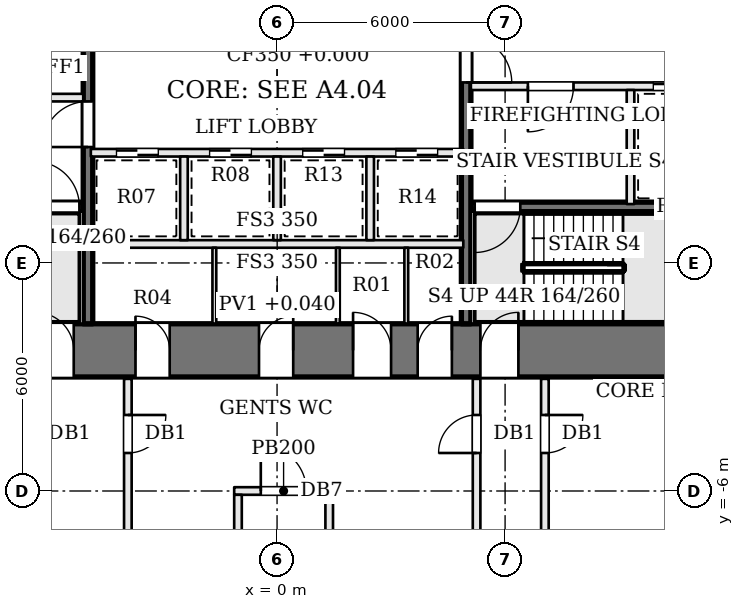
"""IFC4 building model, lengths in metres.
Left out: names, types, materials, properties, quantities, classifications, styles, units other than length and angle.
Written with IfcOpenShell. Run it as: python <this file> out.ifc"""

import sys

from ifc_helpers import new_model, si_unit, direction, frame, frame_2d, origin, place, context, subcontext, project, spatial, rectangle, extrude, element, fill, save


model = new_model("IFC4")
c1 = context("Model", 3, precision=1e-05, world=origin(), true_north=direction((0.0, 1.0)))
c2 = subcontext(c1, "Body", "Model", "MODEL_VIEW")
j1 = project(units=[si_unit("LENGTHUNIT", "METRE"), si_unit("PLANEANGLEUNIT", "RADIAN")], contexts=[c1])
p1 = place(None, origin())
s1 = spatial("IfcSite", under=j1, at=p1, CompositionType="ELEMENT")
p2 = place(p1, origin())
s2 = spatial("IfcBuilding", under=s1, at=p2, CompositionType="ELEMENT")
p3 = place(p2, origin())
s3 = spatial("IfcBuildingStorey", under=s2, at=p3, CompositionType="ELEMENT", Elevation=0.0)
p4 = place(p3, frame((-13.0, -2.3, 0.0), z_axis=(0.0, 0.0, 1.0), x_axis=(1.0, 0.0, 0.0)))
e1 = element("IfcWall", 1, at=p4, inside=s3, PredefinedType="SHEAR", context=c2, shape_type="SweptSolid", body=[
    extrude(rectangle(XDim=26.0, YDim=1.4, at=frame_2d((13.0, 0.0))), origin(), (0.0, 0.0, 1.0), 7.2),
])
p5 = place(p4, frame((9.275, 0.0, 0.0)))
e2 = element("IfcOpeningElement", 2, at=p5, cuts=e1, PredefinedType="OPENING", context=c2, shape_type="SweptSolid", body=[
    extrude(rectangle(XDim=0.9, YDim=2.1, at=frame_2d((0.45, 1.05))), frame((0.0, 0.71, 0.0), z_axis=(0.0, -1.0, 0.0), x_axis=(1.0, 0.0, 0.0)), (0.0, 0.0, 1.0), 1.42),
])
p6 = place(p4, frame((12.525, 0.0, 0.0)))
e3 = element("IfcOpeningElement", 3, at=p6, cuts=e1, PredefinedType="OPENING", context=c2, shape_type="SweptSolid", body=[
    extrude(rectangle(XDim=0.9, YDim=2.1, at=frame_2d((0.45, 1.05))), frame((0.0, 0.71, 0.0), z_axis=(0.0, -1.0, 0.0), x_axis=(1.0, 0.0, 0.0)), (0.0, 0.0, 1.0), 1.42),
])
p7 = place(p4, frame((15.0, 0.0, 0.0)))
e4 = element("IfcOpeningElement", 4, at=p7, cuts=e1, PredefinedType="OPENING", context=c2, shape_type="SweptSolid", body=[
    extrude(rectangle(XDim=1.0, YDim=2.1, at=frame_2d((0.5, 1.05))), frame((0.0, 0.71, 0.0), z_axis=(0.0, -1.0, 0.0), x_axis=(1.0, 0.0, 0.0)), (0.0, 0.0, 1.0), 1.42),
])
p8 = place(p4, frame((16.7, 0.0, 0.0)))
e5 = element("IfcOpeningElement", 5, at=p8, cuts=e1, PredefinedType="OPENING", context=c2, shape_type="SweptSolid", body=[
    extrude(rectangle(XDim=0.9, YDim=2.1, at=frame_2d((0.45, 1.05))), frame((0.0, 0.71, 0.0), z_axis=(0.0, -1.0, 0.0), x_axis=(1.0, 0.0, 0.0)), (0.0, 0.0, 1.0), 1.42),
])
p9 = place(p4, frame((6.65, 0.0, 0.0)))
e6 = element("IfcOpeningElement", 6, at=p9, cuts=e1, PredefinedType="OPENING", context=c2, shape_type="SweptSolid", body=[
    extrude(rectangle(XDim=1.0, YDim=2.1, at=frame_2d((0.5, 1.05))), frame((0.0, 0.71, 0.0), z_axis=(0.0, -1.0, 0.0), x_axis=(1.0, 0.0, 0.0)), (0.0, 0.0, 1.0), 1.42),
])
p10 = place(p4, frame((18.35, 0.0, 0.0)))
e7 = element("IfcOpeningElement", 7, at=p10, cuts=e1, PredefinedType="OPENING", context=c2, shape_type="SweptSolid", body=[
    extrude(rectangle(XDim=1.0, YDim=2.1, at=frame_2d((0.5, 1.05))), frame((0.0, 0.71, 0.0), z_axis=(0.0, -1.0, 0.0), x_axis=(1.0, 0.0, 0.0)), (0.0, 0.0, 1.0), 1.42),
])
p11 = place(p3, frame((-11.6, 1.475, 0.0), z_axis=(0.0, 0.0, 1.0), x_axis=(1.0, 0.0, 0.0)))
e8 = element("IfcWall", 8, at=p11, inside=s3, PredefinedType="SOLIDWALL", context=c2, shape_type="SweptSolid", body=[
    extrude(rectangle(XDim=6.5, YDim=0.25, at=frame_2d((3.25, 0.0))), origin(), (0.0, 0.0, 1.0), 6.95),
])
p12 = place(p11, frame((5.2, 0.0, 0.0)))
e9 = element("IfcOpeningElement", 9, at=p12, cuts=e8, PredefinedType="OPENING", context=c2, shape_type="SweptSolid", body=[
    extrude(rectangle(XDim=1.2, YDim=2.1, at=frame_2d((0.6, 1.05))), frame((0.0, 0.135, 0.0), z_axis=(0.0, -1.0, 0.0), x_axis=(1.0, 0.0, 0.0)), (0.0, 0.0, 1.0), 0.27),
])
p13 = place(p3, frame((-11.6, 4.35, 0.0), z_axis=(0.0, 0.0, 1.0), x_axis=(1.0, 0.0, 0.0)))
e10 = element("IfcWall", 10, at=p13, inside=s3, PredefinedType="SOLIDWALL", context=c2, shape_type="SweptSolid", body=[
    extrude(rectangle(XDim=6.5, YDim=0.2, at=frame_2d((3.25, 0.0))), origin(), (0.0, 0.0, 1.0), 6.95),
])
p14 = place(p13, frame((3.8, 0.0, 0.0)))
e11 = element("IfcOpeningElement", 11, at=p14, cuts=e10, PredefinedType="OPENING", context=c2, shape_type="SweptSolid", body=[
    extrude(rectangle(XDim=1.2, YDim=2.1, at=frame_2d((0.6, 1.05))), frame((0.0, 0.11, 0.0), z_axis=(0.0, -1.0, 0.0), x_axis=(1.0, 0.0, 0.0)), (0.0, 0.0, 1.0), 0.22),
])
p15 = place(p13, frame((0.5, 0.0, 0.0)))
e12 = element("IfcOpeningElement", 12, at=p15, cuts=e10, PredefinedType="OPENING", context=c2, shape_type="SweptSolid", body=[
    extrude(rectangle(XDim=1.2, YDim=2.1, at=frame_2d((0.6, 1.05))), frame((0.0, 0.11, 0.0), z_axis=(0.0, -1.0, 0.0), x_axis=(1.0, 0.0, 0.0)), (0.0, 0.0, 1.0), 0.22),
])
p16 = place(p3, frame((11.6, 4.65, 0.0), z_axis=(0.0, 0.0, 1.0), x_axis=(-1.0, 0.0, 0.0)))
e13 = element("IfcWall", 13, at=p16, inside=s3, PredefinedType="SOLIDWALL", context=c2, shape_type="SweptSolid", body=[
    extrude(rectangle(XDim=6.5, YDim=0.2, at=frame_2d((3.25, 0.0))), origin(), (0.0, 0.0, 1.0), 6.95),
])
p17 = place(p16, frame((3.8, 0.0, 0.0)))
e14 = element("IfcOpeningElement", 14, at=p17, cuts=e13, PredefinedType="OPENING", context=c2, shape_type="SweptSolid", body=[
    extrude(rectangle(XDim=1.2, YDim=2.1, at=frame_2d((0.6, 1.05))), frame((0.0, 0.11, 0.0), z_axis=(0.0, -1.0, 0.0), x_axis=(1.0, 0.0, 0.0)), (0.0, 0.0, 1.0), 0.22),
])
p18 = place(p16, frame((0.5, 0.0, 0.0)))
e15 = element("IfcOpeningElement", 15, at=p18, cuts=e13, PredefinedType="OPENING", context=c2, shape_type="SweptSolid", body=[
    extrude(rectangle(XDim=1.2, YDim=2.1, at=frame_2d((0.6, 1.05))), frame((0.0, 0.11, 0.0), z_axis=(0.0, -1.0, 0.0), x_axis=(1.0, 0.0, 0.0)), (0.0, 0.0, 1.0), 0.22),
])
p19 = place(p3, frame((11.6, 1.475, 0.0), z_axis=(0.0, 0.0, 1.0), x_axis=(-1.0, 0.0, 0.0)))
e16 = element("IfcWall", 16, at=p19, inside=s3, PredefinedType="SOLIDWALL", context=c2, shape_type="SweptSolid", body=[
    extrude(rectangle(XDim=6.5, YDim=0.25, at=frame_2d((3.25, 0.0))), origin(), (0.0, 0.0, 1.0), 6.95),
])
p20 = place(p19, frame((5.2, 0.0, 0.0)))
e17 = element("IfcOpeningElement", 17, at=p20, cuts=e16, PredefinedType="OPENING", context=c2, shape_type="SweptSolid", body=[
    extrude(rectangle(XDim=1.2, YDim=2.1, at=frame_2d((0.6, 1.05))), frame((0.0, 0.135, 0.0), z_axis=(0.0, -1.0, 0.0), x_axis=(1.0, 0.0, 0.0)), (0.0, 0.0, 1.0), 0.27),
])
p21 = place(p3, frame((9.3, 4.55, 0.0), z_axis=(0.0, 0.0, 1.0), x_axis=(0.0, -1.0, 0.0)))
e18 = element("IfcWall", 18, at=p21, inside=s3, PredefinedType="SOLIDWALL", context=c2, shape_type="SweptSolid", body=[
    extrude(rectangle(XDim=3.0, YDim=0.2, at=frame_2d((1.5, 0.0))), origin(), (0.0, 0.0, 1.0), 6.95),
])
p22 = place(p3, frame((-4.975, -1.6, 0.0), z_axis=(0.0, 0.0, 1.0), x_axis=(0.0, 1.0, 0.0)))
e19 = element("IfcWall", 19, at=p22, inside=s3, PredefinedType="SOLIDWALL", context=c2, shape_type="SweptSolid", body=[
    extrude(rectangle(XDim=12.2, YDim=0.25, at=frame_2d((6.1, 0.0))), origin(), (0.0, 0.0, 1.0), 6.95),
])
p23 = place(p22, frame((4.65, 0.0, 0.0)))
e20 = element("IfcOpeningElement", 20, at=p23, cuts=e19, PredefinedType="OPENING", context=c2, shape_type="SweptSolid", body=[
    extrude(rectangle(XDim=1.2, YDim=2.1, at=frame_2d((0.6, 1.05))), frame((0.0, 0.135, 0.0), z_axis=(0.0, -1.0, 0.0), x_axis=(1.0, 0.0, 0.0)), (0.0, 0.0, 1.0), 0.27),
])
p24 = place(p3, frame((4.975, 10.6, 0.0), z_axis=(0.0, 0.0, 1.0), x_axis=(0.0, -1.0, 0.0)))
e21 = element("IfcWall", 21, at=p24, inside=s3, PredefinedType="SOLIDWALL", context=c2, shape_type="SweptSolid", body=[
    extrude(rectangle(XDim=12.2, YDim=0.25, at=frame_2d((6.1, 0.0))), origin(), (0.0, 0.0, 1.0), 6.95),
])
p25 = place(p24, frame((4.65, 0.0, 0.0)))
e22 = element("IfcOpeningElement", 22, at=p25, cuts=e21, PredefinedType="OPENING", context=c2, shape_type="SweptSolid", body=[
    extrude(rectangle(XDim=1.2, YDim=2.1, at=frame_2d((0.6, 1.05))), frame((0.0, 0.135, 0.0), z_axis=(0.0, -1.0, 0.0), x_axis=(1.0, 0.0, 0.0)), (0.0, 0.0, 1.0), 0.27),
])
p26 = place(p3, frame((-4.9, 0.5, 0.0), z_axis=(0.0, 0.0, 1.0), x_axis=(1.0, 0.0, 0.0)))
e23 = element("IfcWall", 23, at=p26, inside=s3, PredefinedType="SOLIDWALL", context=c2, shape_type="SweptSolid", body=[
    extrude(rectangle(XDim=9.8, YDim=0.2, at=frame_2d((4.9, 0.0))), origin(), (0.0, 0.0, 1.0), 6.95),
])
p27 = place(p3, frame((-4.9, 2.9, 0.0), z_axis=(0.0, 0.0, 1.0), x_axis=(1.0, 0.0, 0.0)))
e24 = element("IfcWall", 24, at=p27, inside=s3, PredefinedType="SOLIDWALL", context=c2, shape_type="SweptSolid", body=[
    extrude(rectangle(XDim=9.8, YDim=0.2, at=frame_2d((4.9, 0.0))), origin(), (0.0, 0.0, 1.0), 6.95),
])
p28 = place(p27, frame((0.675, 0.0, 0.0)))
e25 = element("IfcOpeningElement", 25, at=p28, cuts=e24, PredefinedType="OPENING", context=c2, shape_type="SweptSolid", body=[
    extrude(rectangle(XDim=1.1, YDim=2.1, at=frame_2d((0.55, 1.05))), frame((0.0, 0.11, 0.0), z_axis=(0.0, -1.0, 0.0), x_axis=(1.0, 0.0, 0.0)), (0.0, 0.0, 1.0), 0.22),
])
p29 = place(p27, frame((3.125, 0.0, 0.0)))
e26 = element("IfcOpeningElement", 26, at=p29, cuts=e24, PredefinedType="OPENING", context=c2, shape_type="SweptSolid", body=[
    extrude(rectangle(XDim=1.1, YDim=2.1, at=frame_2d((0.55, 1.05))), frame((0.0, 0.11, 0.0), z_axis=(0.0, -1.0, 0.0), x_axis=(1.0, 0.0, 0.0)), (0.0, 0.0, 1.0), 0.22),
])
p30 = place(p27, frame((5.575, 0.0, 0.0)))
e27 = element("IfcOpeningElement", 27, at=p30, cuts=e24, PredefinedType="OPENING", context=c2, shape_type="SweptSolid", body=[
    extrude(rectangle(XDim=1.1, YDim=2.1, at=frame_2d((0.55, 1.05))), frame((0.0, 0.11, 0.0), z_axis=(0.0, -1.0, 0.0), x_axis=(1.0, 0.0, 0.0)), (0.0, 0.0, 1.0), 0.22),
])
p31 = place(p27, frame((8.025, 0.0, 0.0)))
e28 = element("IfcOpeningElement", 28, at=p31, cuts=e24, PredefinedType="OPENING", context=c2, shape_type="SweptSolid", body=[
    extrude(rectangle(XDim=1.1, YDim=2.1, at=frame_2d((0.55, 1.05))), frame((0.0, 0.11, 0.0), z_axis=(0.0, -1.0, 0.0), x_axis=(1.0, 0.0, 0.0)), (0.0, 0.0, 1.0), 0.22),
])
for number, where, z_axis, x_axis in (
    (29, (-2.45, 0.6, 0.0), (0.0, 0.0, 1.0), (0.0, 1.0, 0.0)),
    (30, (0.0, 0.6, 0.0), (0.0, 0.0, 1.0), (0.0, 1.0, 0.0)),
    (31, (2.45, 0.6, 0.0), (0.0, 0.0, 1.0), (0.0, 1.0, 0.0)),
):
    element("IfcWall", number, at=place(p3, frame(where, z_axis=z_axis, x_axis=x_axis)), inside=s3, PredefinedType="SOLIDWALL", context=c2, shape_type="SweptSolid", body=[
        extrude(rectangle(XDim=2.2, YDim=0.2, at=frame_2d((1.1, 0.0))), origin(), (0.0, 0.0, 1.0), 6.95),
    ])
for number, where, z_axis, x_axis in (
    (32, (-1.65, -1.6, 0.0), (0.0, 0.0, 1.0), (0.0, 1.0, 0.0)),
    (33, (1.6, -1.6, 0.0), (0.0, 0.0, 1.0), (0.0, 1.0, 0.0)),
    (34, (3.4, -1.6, 0.0), (0.0, 0.0, 1.0), (0.0, 1.0, 0.0)),
):
    element("IfcWall", number, at=place(p3, frame(where, z_axis=z_axis, x_axis=x_axis)), inside=s3, PredefinedType="PARTITIONING", context=c2, shape_type="SweptSolid", body=[
        extrude(rectangle(XDim=2.0, YDim=0.1, at=frame_2d((1.0, 0.0))), origin(), (0.0, 0.0, 1.0), 6.95),
    ])
p32 = place(p3, frame((-3.926, -3.05, 0.0), z_axis=(0.0, 0.0, 1.0), x_axis=(0.0, -1.0, 0.0)))
e35 = element("IfcWall", 35, at=p32, inside=s3, PredefinedType="PARTITIONING", context=c2, shape_type="SweptSolid", body=[
    extrude(rectangle(XDim=19.252, YDim=0.2, at=frame_2d((9.626, 0.0))), origin(), (0.0, 0.0, 1.0), 6.23),
])
p33 = place(p32, frame((0.95, 0.0, 0.0)))
e36 = element("IfcOpeningElement", 36, at=p33, cuts=e35, PredefinedType="OPENING", context=c2, shape_type="SweptSolid", body=[
    extrude(rectangle(XDim=1.0, YDim=2.1, at=frame_2d((0.5, 1.05))), frame((0.0, 0.11, 0.0), z_axis=(0.0, -1.0, 0.0), x_axis=(1.0, 0.0, 0.0)), (0.0, 0.0, 1.0), 0.22),
])
p34 = place(p3, frame((7.047, -3.05, 0.0), z_axis=(0.0, 0.0, 1.0), x_axis=(0.0, -1.0, 0.0)))
e37 = element("IfcWall", 37, at=p34, inside=s3, PredefinedType="PARTITIONING", context=c2, shape_type="SweptSolid", body=[
    extrude(rectangle(XDim=18.98, YDim=0.2, at=frame_2d((9.49, 0.0))), origin(), (0.0, 0.0, 1.0), 6.23),
])
p35 = place(p34, frame((0.95, 0.0, 0.0)))
e38 = element("IfcOpeningElement", 38, at=p35, cuts=e37, PredefinedType="OPENING", context=c2, shape_type="SweptSolid", body=[
    extrude(rectangle(XDim=1.0, YDim=2.1, at=frame_2d((0.5, 1.05))), frame((0.0, 0.11, 0.0), z_axis=(0.0, -1.0, 0.0), x_axis=(1.0, 0.0, 0.0)), (0.0, 0.0, 1.0), 0.22),
])
p36 = place(p3, frame((5.25, -22.21, 0.0), z_axis=(0.0, 0.0, 1.0), x_axis=(0.0, 1.0, 0.0)))
e39 = element("IfcWall", 39, at=p36, inside=s3, PredefinedType="PARTITIONING", context=c2, shape_type="SweptSolid", body=[
    extrude(rectangle(XDim=19.16, YDim=0.2, at=frame_2d((9.58, 0.0))), origin(), (0.0, 0.0, 1.0), 6.23),
])
p37 = place(p36, frame((17.21, 0.0, 0.0)))
e40 = element("IfcOpeningElement", 40, at=p37, cuts=e39, PredefinedType="OPENING", context=c2, shape_type="SweptSolid", body=[
    extrude(rectangle(XDim=1.0, YDim=2.1, at=frame_2d((0.5, 1.05))), frame((0.0, 0.11, 0.0), z_axis=(0.0, -1.0, 0.0), x_axis=(1.0, 0.0, 0.0)), (0.0, 0.0, 1.0), 0.22),
])
p38 = place(p3, frame((-1.128, -6.0, 0.0), z_axis=(0.0, 0.0, 1.0), x_axis=(1.0, 0.0, 0.0)))
e41 = element("IfcWall", 41, at=p38, inside=s3, PredefinedType="PARTITIONING", context=c2, shape_type="SweptSolid", body=[
    extrude(rectangle(XDim=2.6, YDim=0.2, at=frame_2d((1.3, 0.0))), origin(), (0.0, 0.0, 1.0), 6.23),
])
p39 = place(p38, frame((0.7, 0.0, 0.0)))
e42 = element("IfcOpeningElement", 42, at=p39, cuts=e41, PredefinedType="OPENING", context=c2, shape_type="SweptSolid", body=[
    extrude(rectangle(XDim=1.2, YDim=2.1, at=frame_2d((0.6, 1.05))), frame((0.0, 0.11, 0.0), z_axis=(0.0, -1.0, 0.0), x_axis=(1.0, 0.0, 0.0)), (0.0, 0.0, 1.0), 0.22),
])
p40 = place(p3, frame((1.372, -6.1, 0.0), z_axis=(0.0, 0.0, 1.0), x_axis=(0.0, -1.0, 0.0)))
e43 = element("IfcWall", 43, at=p40, inside=s3, PredefinedType="PARTITIONING", context=c2, shape_type="SweptSolid", body=[
    extrude(rectangle(XDim=13.546, YDim=0.2, at=frame_2d((6.773, 0.0))), origin(), (0.0, 0.0, 1.0), 6.23),
])
p41 = place(p40, frame((5.717, 0.0, 0.0)))
e44 = element("IfcOpeningElement", 44, at=p41, cuts=e43, PredefinedType="OPENING", context=c2, shape_type="SweptSolid", body=[
    extrude(rectangle(XDim=1.2, YDim=2.1, at=frame_2d((0.6, 1.05))), frame((0.0, 0.11, 0.0), z_axis=(0.0, -1.0, 0.0), x_axis=(1.0, 0.0, 0.0)), (0.0, 0.0, 1.0), 0.22),
])
p42 = place(p3, frame((-1.028, -19.446, 0.0), z_axis=(0.0, 0.0, 1.0), x_axis=(0.0, 1.0, 0.0)))
e45 = element("IfcWall", 45, at=p42, inside=s3, PredefinedType="PARTITIONING", context=c2, shape_type="SweptSolid", body=[
    extrude(rectangle(XDim=13.346, YDim=0.2, at=frame_2d((6.673, 0.0))), origin(), (0.0, 0.0, 1.0), 6.23),
])
p43 = place(p42, frame((6.423, 0.0, 0.0)))
e46 = element("IfcOpeningElement", 46, at=p43, cuts=e45, PredefinedType="OPENING", context=c2, shape_type="SweptSolid", body=[
    extrude(rectangle(XDim=1.2, YDim=2.1, at=frame_2d((0.6, 1.05))), frame((0.0, 0.11, 0.0), z_axis=(0.0, -1.0, 0.0), x_axis=(1.0, 0.0, 0.0)), (0.0, 0.0, 1.0), 0.22),
])
p44 = place(p23, origin())
e47 = element("IfcDoor", 47, at=p44, inside=s3, OperationType="SINGLE_SWING_LEFT", PredefinedType="DOOR", context=c2, shape_type="SweptSolid", body=[
    extrude(rectangle(XDim=1.2, YDim=2.1, at=frame_2d((0.6, 1.05))), frame((0.0, 0.025, 0.0), z_axis=(0.0, -1.0, 0.0), x_axis=(1.0, 0.0, 0.0)), (0.0, 0.0, 1.0), 0.05),
])
fill(e20, e47)
p45 = place(p25, origin())
e48 = element("IfcDoor", 48, at=p45, inside=s3, OperationType="SINGLE_SWING_RIGHT", PredefinedType="DOOR", context=c2, shape_type="SweptSolid", body=[
    extrude(rectangle(XDim=1.2, YDim=2.1, at=frame_2d((0.6, 1.05))), frame((0.0, 0.025, 0.0), z_axis=(0.0, -1.0, 0.0), x_axis=(1.0, 0.0, 0.0)), (0.0, 0.0, 1.0), 0.05),
])
fill(e22, e48)
p46 = place(p17, origin())
e49 = element("IfcDoor", 49, at=p46, inside=s3, OperationType="SINGLE_SWING_RIGHT", PredefinedType="DOOR", context=c2, shape_type="SweptSolid", body=[
    extrude(rectangle(XDim=1.2, YDim=2.1, at=frame_2d((0.6, 1.05))), frame((0.0, 0.025, 0.0), z_axis=(0.0, -1.0, 0.0), x_axis=(1.0, 0.0, 0.0)), (0.0, 0.0, 1.0), 0.05),
])
fill(e14, e49)
p47 = place(p12, origin())
e50 = element("IfcDoor", 50, at=p47, inside=s3, OperationType="SINGLE_SWING_LEFT", PredefinedType="DOOR", context=c2, shape_type="SweptSolid", body=[
    extrude(rectangle(XDim=1.2, YDim=2.1, at=frame_2d((0.6, 1.05))), frame((0.0, 0.025, 0.0), z_axis=(0.0, -1.0, 0.0), x_axis=(1.0, 0.0, 0.0)), (0.0, 0.0, 1.0), 0.05),
])
fill(e9, e50)
p48 = place(p20, origin())
e51 = element("IfcDoor", 51, at=p48, inside=s3, OperationType="SINGLE_SWING_RIGHT", PredefinedType="DOOR", context=c2, shape_type="SweptSolid", body=[
    extrude(rectangle(XDim=1.2, YDim=2.1, at=frame_2d((0.6, 1.05))), frame((0.0, 0.025, 0.0), z_axis=(0.0, -1.0, 0.0), x_axis=(1.0, 0.0, 0.0)), (0.0, 0.0, 1.0), 0.05),
])
fill(e17, e51)
p49 = place(p18, origin())
e52 = element("IfcDoor", 52, at=p49, inside=s3, OperationType="SLIDING_TO_RIGHT", PredefinedType="DOOR", context=c2, shape_type="SweptSolid", body=[
    extrude(rectangle(XDim=1.2, YDim=2.1, at=frame_2d((0.6, 1.05))), frame((0.0, 0.025, 0.0), z_axis=(0.0, -1.0, 0.0), x_axis=(1.0, 0.0, 0.0)), (0.0, 0.0, 1.0), 0.05),
])
fill(e15, e52)
p50 = place(p28, origin())
e53 = element("IfcDoor", 53, at=p50, inside=s3, OperationType="SLIDING_TO_RIGHT", PredefinedType="DOOR", context=c2, shape_type="SweptSolid", body=[
    extrude(rectangle(XDim=1.1, YDim=2.1, at=frame_2d((0.55, 1.05))), frame((0.0, 0.025, 0.0), z_axis=(0.0, -1.0, 0.0), x_axis=(1.0, 0.0, 0.0)), (0.0, 0.0, 1.0), 0.05),
])
fill(e25, e53)
p51 = place(p29, origin())
e54 = element("IfcDoor", 54, at=p51, inside=s3, OperationType="SLIDING_TO_LEFT", PredefinedType="DOOR", context=c2, shape_type="SweptSolid", body=[
    extrude(rectangle(XDim=1.1, YDim=2.1, at=frame_2d((0.55, 1.05))), frame((0.0, 0.025, 0.0), z_axis=(0.0, -1.0, 0.0), x_axis=(1.0, 0.0, 0.0)), (0.0, 0.0, 1.0), 0.05),
])
fill(e26, e54)
p52 = place(p30, origin())
e55 = element("IfcDoor", 55, at=p52, inside=s3, OperationType="SLIDING_TO_LEFT", PredefinedType="DOOR", context=c2, shape_type="SweptSolid", body=[
    extrude(rectangle(XDim=1.1, YDim=2.1, at=frame_2d((0.55, 1.05))), frame((0.0, 0.025, 0.0), z_axis=(0.0, -1.0, 0.0), x_axis=(1.0, 0.0, 0.0)), (0.0, 0.0, 1.0), 0.05),
])
fill(e27, e55)
p53 = place(p31, origin())
e56 = element("IfcDoor", 56, at=p53, inside=s3, OperationType="SLIDING_TO_RIGHT", PredefinedType="DOOR", context=c2, shape_type="SweptSolid", body=[
    extrude(rectangle(XDim=1.1, YDim=2.1, at=frame_2d((0.55, 1.05))), frame((0.0, 0.025, 0.0), z_axis=(0.0, -1.0, 0.0), x_axis=(1.0, 0.0, 0.0)), (0.0, 0.0, 1.0), 0.05),
])
fill(e28, e56)
p54 = place(p5, origin())
e57 = element("IfcDoor", 57, at=p54, inside=s3, OperationType="SINGLE_SWING_LEFT", PredefinedType="DOOR", context=c2, shape_type="SweptSolid", body=[
    extrude(rectangle(XDim=0.9, YDim=2.1, at=frame_2d((0.45, 1.05))), frame((0.0, 0.025, 0.0), z_axis=(0.0, -1.0, 0.0), x_axis=(1.0, 0.0, 0.0)), (0.0, 0.0, 1.0), 0.05),
])
fill(e2, e57)
p55 = place(p6, origin())
e58 = element("IfcDoor", 58, at=p55, inside=s3, OperationType="SINGLE_SWING_RIGHT", PredefinedType="DOOR", context=c2, shape_type="SweptSolid", body=[
    extrude(rectangle(XDim=0.9, YDim=2.1, at=frame_2d((0.45, 1.05))), frame((0.0, 0.025, 0.0), z_axis=(0.0, -1.0, 0.0), x_axis=(1.0, 0.0, 0.0)), (0.0, 0.0, 1.0), 0.05),
])
fill(e3, e58)
p56 = place(p7, origin())
e59 = element("IfcDoor", 59, at=p56, inside=s3, OperationType="SINGLE_SWING_LEFT", PredefinedType="DOOR", context=c2, shape_type="SweptSolid", body=[
    extrude(rectangle(XDim=1.0, YDim=2.1, at=frame_2d((0.5, 1.05))), frame((0.0, 0.025, 0.0), z_axis=(0.0, -1.0, 0.0), x_axis=(1.0, 0.0, 0.0)), (0.0, 0.0, 1.0), 0.05),
])
fill(e4, e59)
p57 = place(p8, origin())
e60 = element("IfcDoor", 60, at=p57, inside=s3, OperationType="SINGLE_SWING_RIGHT", PredefinedType="DOOR", context=c2, shape_type="SweptSolid", body=[
    extrude(rectangle(XDim=0.9, YDim=2.1, at=frame_2d((0.45, 1.05))), frame((0.0, 0.025, 0.0), z_axis=(0.0, -1.0, 0.0), x_axis=(1.0, 0.0, 0.0)), (0.0, 0.0, 1.0), 0.05),
])
fill(e5, e60)
p58 = place(p9, origin())
e61 = element("IfcDoor", 61, at=p58, inside=s3, OperationType="SINGLE_SWING_LEFT", PredefinedType="DOOR", context=c2, shape_type="SweptSolid", body=[
    extrude(rectangle(XDim=1.0, YDim=2.1, at=frame_2d((0.5, 1.05))), frame((0.0, 0.025, 0.0), z_axis=(0.0, -1.0, 0.0), x_axis=(1.0, 0.0, 0.0)), (0.0, 0.0, 1.0), 0.05),
])
fill(e6, e61)
p59 = place(p10, origin())
e62 = element("IfcDoor", 62, at=p59, inside=s3, OperationType="SINGLE_SWING_RIGHT", PredefinedType="DOOR", context=c2, shape_type="SweptSolid", body=[
    extrude(rectangle(XDim=1.0, YDim=2.1, at=frame_2d((0.5, 1.05))), frame((0.0, 0.025, 0.0), z_axis=(0.0, -1.0, 0.0), x_axis=(1.0, 0.0, 0.0)), (0.0, 0.0, 1.0), 0.05),
])
fill(e7, e62)
p60 = place(p33, origin())
e63 = element("IfcDoor", 63, at=p60, inside=s3, OperationType="SINGLE_SWING_LEFT", PredefinedType="DOOR", context=c2, shape_type="SweptSolid", body=[
    extrude(rectangle(XDim=1.0, YDim=2.1, at=frame_2d((0.5, 1.05))), frame((0.0, 0.025, 0.0), z_axis=(0.0, -1.0, 0.0), x_axis=(1.0, 0.0, 0.0)), (0.0, 0.0, 1.0), 0.05),
])
fill(e36, e63)
p61 = place(p35, origin())
e64 = element("IfcDoor", 64, at=p61, inside=s3, OperationType="SINGLE_SWING_LEFT", PredefinedType="DOOR", context=c2, shape_type="SweptSolid", body=[
    extrude(rectangle(XDim=1.0, YDim=2.1, at=frame_2d((0.5, 1.05))), frame((0.0, 0.025, 0.0), z_axis=(0.0, -1.0, 0.0), x_axis=(1.0, 0.0, 0.0)), (0.0, 0.0, 1.0), 0.05),
])
fill(e38, e64)
p62 = place(p37, origin())
e65 = element("IfcDoor", 65, at=p62, inside=s3, OperationType="SINGLE_SWING_LEFT", PredefinedType="DOOR", context=c2, shape_type="SweptSolid", body=[
    extrude(rectangle(XDim=1.0, YDim=2.1, at=frame_2d((0.5, 1.05))), frame((0.0, 0.025, 0.0), z_axis=(0.0, -1.0, 0.0), x_axis=(1.0, 0.0, 0.0)), (0.0, 0.0, 1.0), 0.05),
])
fill(e40, e65)
p63 = place(p39, origin())
e66 = element("IfcDoor", 66, at=p63, inside=s3, OperationType="SINGLE_SWING_LEFT", PredefinedType="DOOR", context=c2, shape_type="SweptSolid", body=[
    extrude(rectangle(XDim=1.2, YDim=2.1, at=frame_2d((0.6, 1.05))), frame((0.0, 0.025, 0.0), z_axis=(0.0, -1.0, 0.0), x_axis=(1.0, 0.0, 0.0)), (0.0, 0.0, 1.0), 0.05),
])
fill(e42, e66)
save(model, sys.argv[1])
